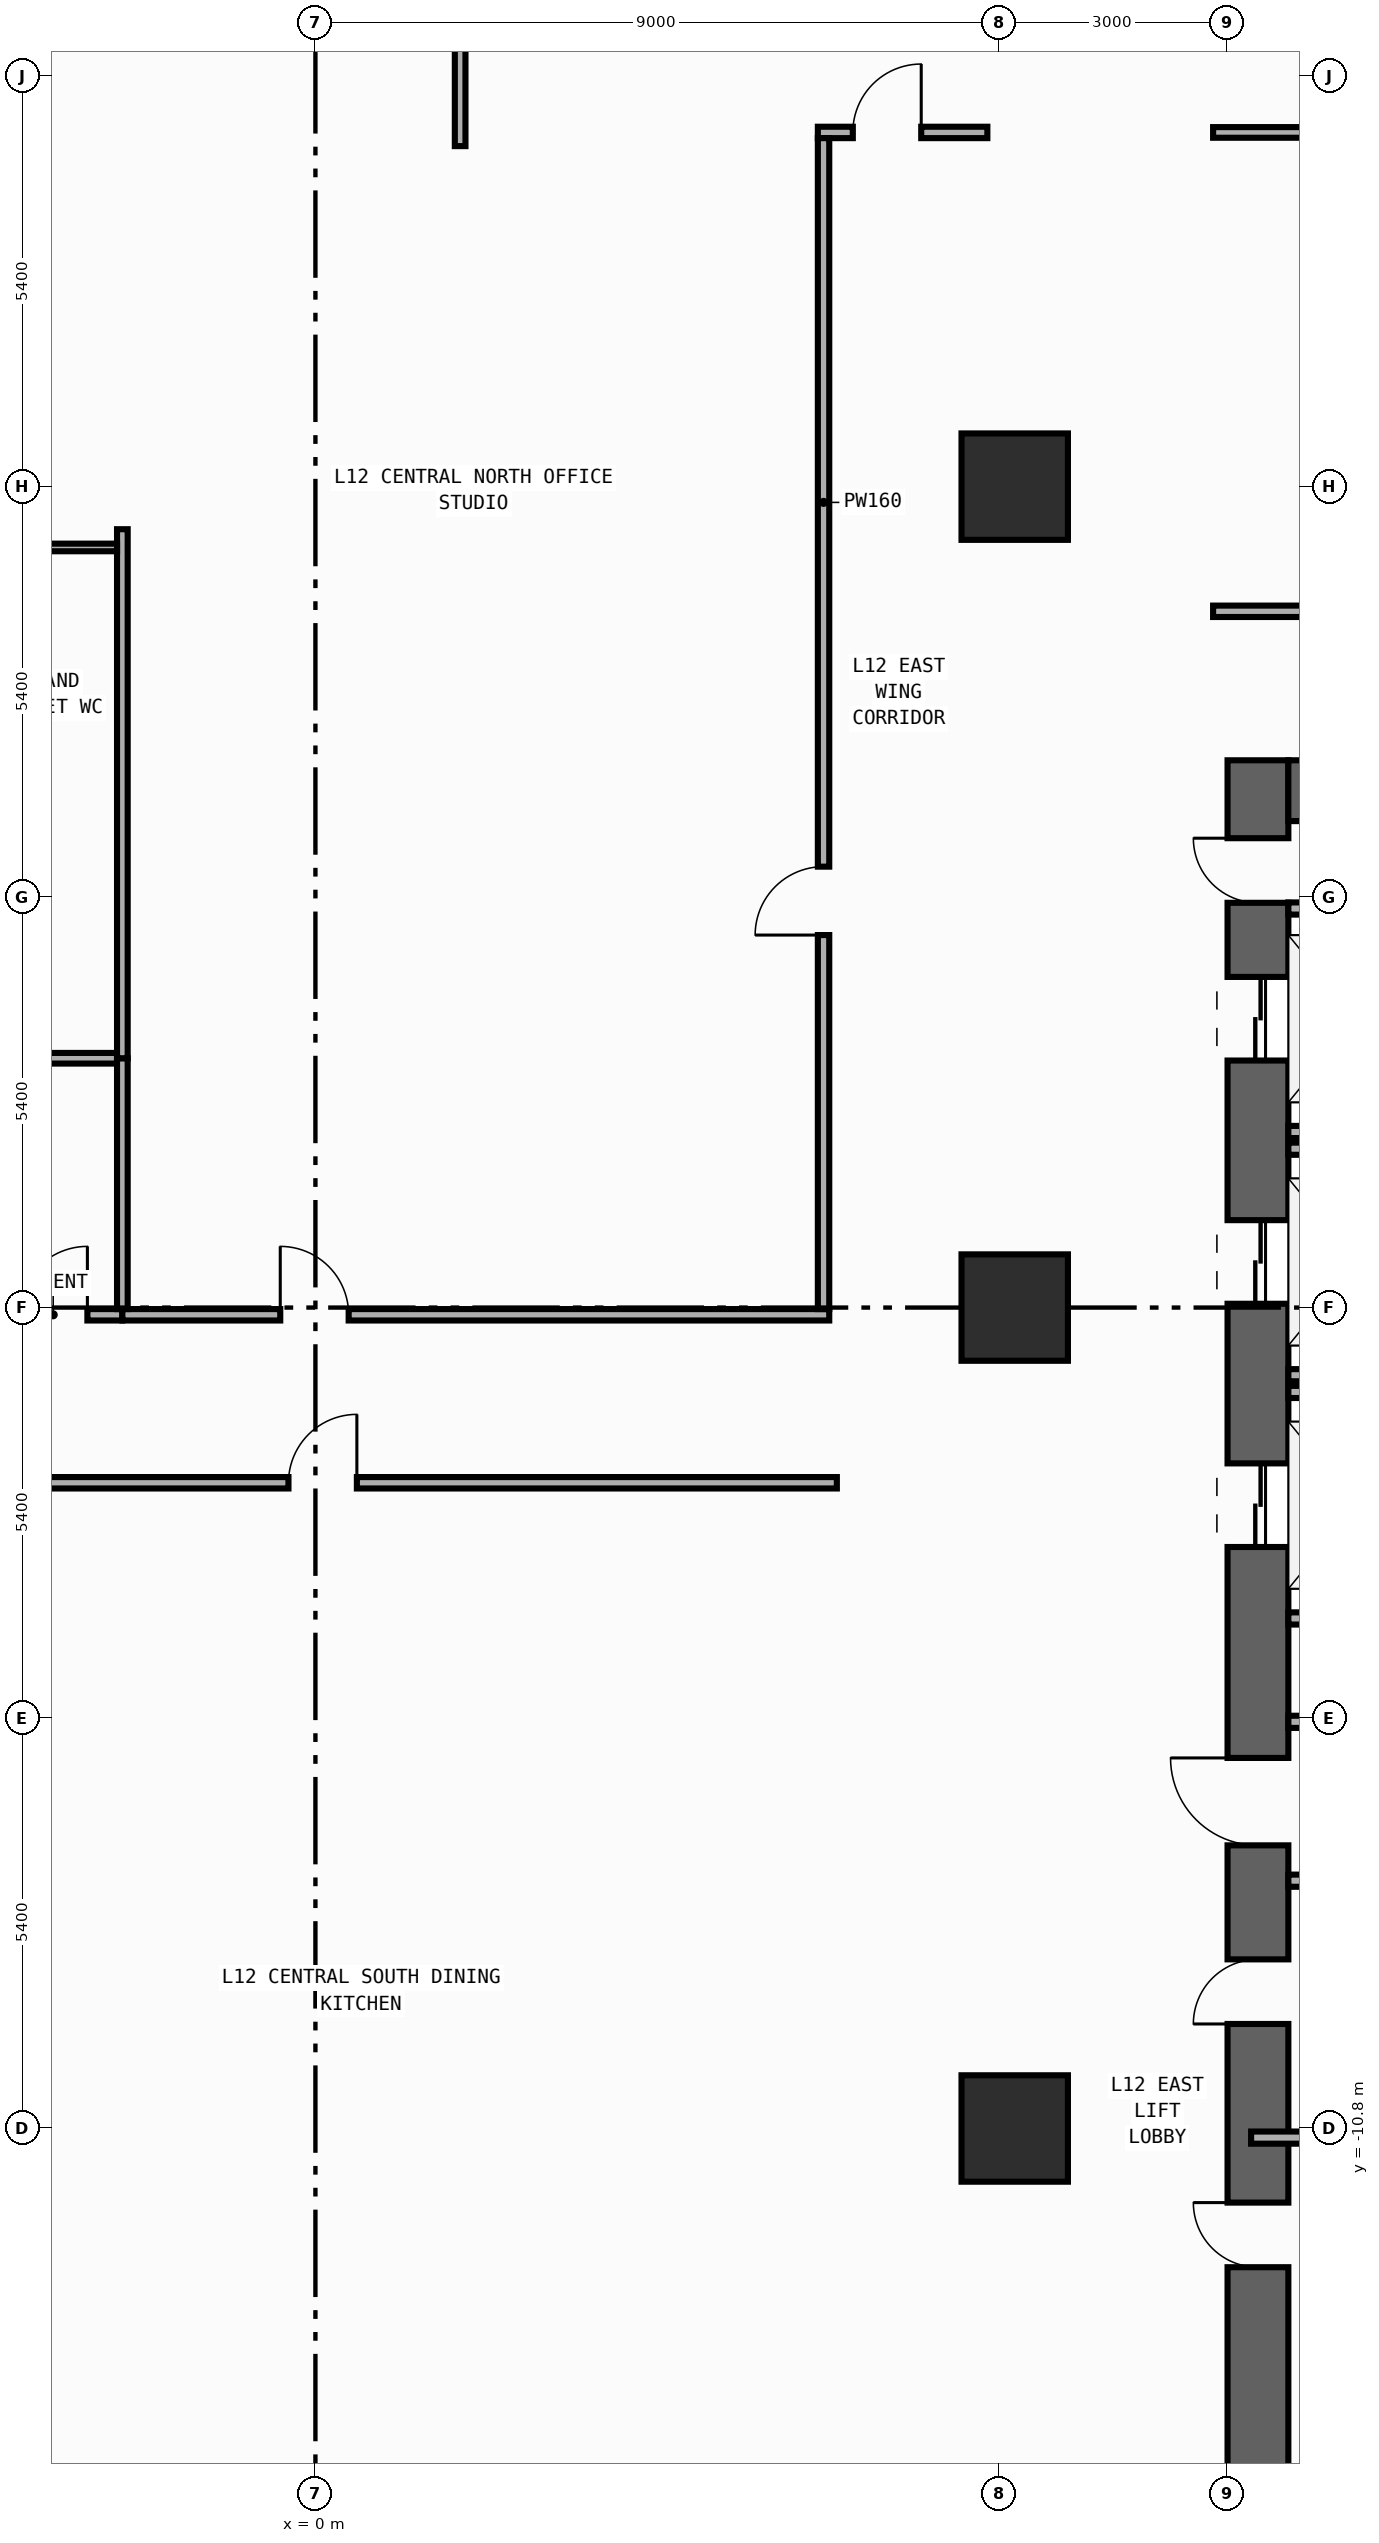
"""IFC4 building model, lengths in metres.
Left out: names, types, materials, properties, quantities, classifications, styles, units other than length and angle.
Written with IfcOpenShell. Run it as: python <this file> out.ifc"""

import sys

from ifc_helpers import new_model, si_unit, direction, frame, frame_2d, origin, origin_2d, place, context, subcontext, project, spatial, rectangle, extrude, element, fill, save


model = new_model("IFC4")
c1 = context("Model", 3, precision=1e-05, world=origin(), true_north=direction((0.0, 1.0)))
c2 = subcontext(c1, "Body", "Model", "MODEL_VIEW")
j1 = project(units=[si_unit("LENGTHUNIT", "METRE"), si_unit("PLANEANGLEUNIT", "RADIAN")], contexts=[c1])
p1 = place(None, origin())
s1 = spatial("IfcSite", under=j1, at=p1, CompositionType="ELEMENT")
p2 = place(p1, origin())
s2 = spatial("IfcBuilding", under=s1, at=p2, CompositionType="ELEMENT")
p3 = place(p2, frame((0.0, 0.0, 51.2)))
s3 = spatial("IfcBuildingStorey", under=s2, at=p3, CompositionType="ELEMENT", Elevation=51.2)
p4 = place(p3, frame((12.4, -19.8, 0.0), z_axis=(0.0, 0.0, 1.0), x_axis=(0.0, 1.0, 0.0)))
e1 = element("IfcWall", 1, at=p4, inside=s3, PredefinedType="SHEAR", context=c2, shape_type="SweptSolid", body=[
    extrude(rectangle(XDim=27.0, YDim=0.8, at=frame_2d((13.5, 0.0))), origin(), (0.0, 0.0, 1.0), 3.94),
])
p5 = place(p4, frame((23.05, 0.0, 0.0)))
e2 = element("IfcOpeningElement", 2, at=p5, cuts=e1, PredefinedType="OPENING", context=c2, shape_type="SweptSolid", body=[
    extrude(rectangle(XDim=1.1, YDim=2.2, at=frame_2d((0.55, 1.1))), frame((0.0, 0.41, 0.0), z_axis=(0.0, -1.0, 0.0), x_axis=(1.0, 0.0, 0.0)), (0.0, 0.0, 1.0), 0.82),
])
p6 = place(p4, frame((19.85, 0.0, 0.0)))
e3 = element("IfcOpeningElement", 3, at=p6, cuts=e1, PredefinedType="OPENING", context=c2, shape_type="SweptSolid", body=[
    extrude(rectangle(XDim=1.1, YDim=2.2, at=frame_2d((0.55, 1.1))), frame((0.0, 0.41, 0.0), z_axis=(0.0, -1.0, 0.0), x_axis=(1.0, 0.0, 0.0)), (0.0, 0.0, 1.0), 0.82),
])
p7 = place(p4, frame((16.65, 0.0, 0.0)))
e4 = element("IfcOpeningElement", 4, at=p7, cuts=e1, PredefinedType="OPENING", context=c2, shape_type="SweptSolid", body=[
    extrude(rectangle(XDim=1.1, YDim=2.2, at=frame_2d((0.55, 1.1))), frame((0.0, 0.41, 0.0), z_axis=(0.0, -1.0, 0.0), x_axis=(1.0, 0.0, 0.0)), (0.0, 0.0, 1.0), 0.82),
])
p8 = place(p4, frame((7.175, 0.0, 0.0)))
e5 = element("IfcOpeningElement", 5, at=p8, cuts=e1, PredefinedType="OPENING", context=c2, shape_type="SweptSolid", body=[
    extrude(rectangle(XDim=0.85, YDim=2.1, at=frame_2d((0.425, 1.05))), frame((0.0, 0.41, 0.0), z_axis=(0.0, -1.0, 0.0), x_axis=(1.0, 0.0, 0.0)), (0.0, 0.0, 1.0), 0.82),
])
p9 = place(p4, frame((10.375, 0.0, 0.0)))
e6 = element("IfcOpeningElement", 6, at=p9, cuts=e1, PredefinedType="OPENING", context=c2, shape_type="SweptSolid", body=[
    extrude(rectangle(XDim=0.85, YDim=2.1, at=frame_2d((0.425, 1.05))), frame((0.0, 0.41, 0.0), z_axis=(0.0, -1.0, 0.0), x_axis=(1.0, 0.0, 0.0)), (0.0, 0.0, 1.0), 0.82),
])
p10 = place(p4, frame((12.725, 0.0, 0.0)))
e7 = element("IfcOpeningElement", 7, at=p10, cuts=e1, PredefinedType="OPENING", context=c2, shape_type="SweptSolid", body=[
    extrude(rectangle(XDim=1.15, YDim=2.2, at=frame_2d((0.575, 1.1))), frame((0.0, 0.41, 0.0), z_axis=(0.0, -1.0, 0.0), x_axis=(1.0, 0.0, 0.0)), (0.0, 0.0, 1.0), 0.82),
])
p11 = place(p4, frame((25.125, 0.0, 0.0)))
e8 = element("IfcOpeningElement", 8, at=p11, cuts=e1, PredefinedType="OPENING", context=c2, shape_type="SweptSolid", body=[
    extrude(rectangle(XDim=0.85, YDim=2.1, at=frame_2d((0.425, 1.05))), frame((0.0, 0.41, 0.0), z_axis=(0.0, -1.0, 0.0), x_axis=(1.0, 0.0, 0.0)), (0.0, 0.0, 1.0), 0.82),
])
p12 = place(p3, frame((12.8, 6.8, 0.0), z_axis=(0.0, 0.0, 1.0), x_axis=(1.0, 0.0, 0.0)))
e9 = element("IfcWall", 9, at=p12, inside=s3, PredefinedType="SHEAR", context=c2, shape_type="SweptSolid", body=[
    extrude(rectangle(XDim=6.8, YDim=0.8, at=frame_2d((3.4, 0.0))), origin(), (0.0, 0.0, 1.0), 3.94),
])
for number, where, z_axis, x_axis in (
    (10, (9.2, -10.8, 0.0), (0.0, 0.0, 1.0), (1.0, 0.0, 0.0)),
    (11, (9.2, 0.0, 0.0), (0.0, 0.0, 1.0), (1.0, 0.0, 0.0)),
    (12, (9.2, 10.8, 0.0), (0.0, 0.0, 1.0), (1.0, 0.0, 0.0)),
):
    element("IfcColumn", number, at=place(p3, frame(where, z_axis=z_axis, x_axis=x_axis)), inside=s3, PredefinedType="COLUMN", context=c2, shape_type="SweptSolid", body=[
        extrude(rectangle(XDim=1.4, YDim=1.4, at=origin_2d()), origin(), (0.0, 0.0, 1.0), 4.2),
    ])
for number, where, z_axis, x_axis in (
    (13, (12.8, 2.31, 0.0), (0.0, 0.0, 1.0), (1.0, 0.0, 0.0)),
    (14, (12.8, -0.89, 0.0), (0.0, 0.0, 1.0), (1.0, 0.0, 0.0)),
    (15, (12.8, 2.09, 0.0), (0.0, 0.0, 1.0), (1.0, 0.0, 0.0)),
    (16, (12.8, -4.09, 0.0), (0.0, 0.0, 1.0), (1.0, 0.0, 0.0)),
    (17, (12.8, -1.11, 0.0), (0.0, 0.0, 1.0), (1.0, 0.0, 0.0)),
):
    element("IfcWall", number, at=place(p3, frame(where, z_axis=z_axis, x_axis=x_axis)), inside=s3, PredefinedType="STANDARD", context=c2, shape_type="SweptSolid", body=[
        extrude(rectangle(XDim=2.19, YDim=0.16, at=frame_2d((1.095, 0.0))), origin(), (0.0, 0.0, 1.0), 3.94),
    ])
for number, where, z_axis, x_axis in (
    (18, (12.8, -5.45, 0.0), (0.0, 0.0, 1.0), (1.0, 0.0, 0.0)),
    (19, (12.8, -7.54, 0.0), (0.0, 0.0, 1.0), (1.0, 0.0, 0.0)),
    (20, (12.8, 5.25, 0.0), (0.0, 0.0, 1.0), (1.0, 0.0, 0.0)),
):
    element("IfcWall", number, at=place(p3, frame(where, z_axis=z_axis, x_axis=x_axis)), inside=s3, PredefinedType="STANDARD", context=c2, shape_type="SweptSolid", body=[
        extrude(rectangle(XDim=2.6, YDim=0.16, at=frame_2d((1.3, 0.0))), origin(), (0.0, 0.0, 1.0), 3.94),
    ])
p13 = place(p3, frame((12.31, -10.92, 0.0), z_axis=(0.0, 0.0, 1.0), x_axis=(1.0, 0.0, 0.0)))
e21 = element("IfcWall", 21, at=p13, inside=s3, PredefinedType="PARTITIONING", context=c2, shape_type="SweptSolid", body=[
    extrude(rectangle(XDim=3.065, YDim=0.16, at=frame_2d((1.532, 0.0))), origin(), (0.0, 0.0, 1.0), 3.14),
])
p14 = place(p3, frame((-5.56, -0.095, 0.0), z_axis=(0.0, 0.0, 1.0), x_axis=(1.0, 0.0, 0.0)))
e22 = element("IfcWall", 22, at=p14, inside=s3, PredefinedType="PARTITIONING", context=c2, shape_type="SweptSolid", body=[
    extrude(rectangle(XDim=3.02, YDim=0.15, at=frame_2d((1.51, 0.0))), origin(), (0.0, 0.0, 1.0), 3.14),
])
p15 = place(p14, frame((1.66, 0.0, 0.0)))
e23 = element("IfcOpeningElement", 23, at=p15, cuts=e22, PredefinedType="OPENING", context=c2, shape_type="SweptSolid", body=[
    extrude(rectangle(XDim=0.9, YDim=2.15, at=frame_2d((0.45, 1.075))), frame((0.0, 0.085, 0.0), z_axis=(0.0, -1.0, 0.0), x_axis=(1.0, 0.0, 0.0)), (0.0, 0.0, 1.0), 0.17),
])
p16 = place(p3, frame((-2.54, -0.095, 0.0), z_axis=(0.0, 0.0, 1.0), x_axis=(1.0, 0.0, 0.0)))
e24 = element("IfcWall", 24, at=p16, inside=s3, PredefinedType="PARTITIONING", context=c2, shape_type="SweptSolid", body=[
    extrude(rectangle(XDim=9.3, YDim=0.15, at=frame_2d((4.65, 0.0))), origin(), (0.0, 0.0, 1.0), 3.14),
])
p17 = place(p16, frame((2.077, 0.0, 0.0)))
e25 = element("IfcOpeningElement", 25, at=p17, cuts=e24, PredefinedType="OPENING", context=c2, shape_type="SweptSolid", body=[
    extrude(rectangle(XDim=0.9, YDim=2.15, at=frame_2d((0.45, 1.075))), frame((0.0, 0.085, 0.0), z_axis=(0.0, -1.0, 0.0), x_axis=(1.0, 0.0, 0.0)), (0.0, 0.0, 1.0), 0.17),
])
p18 = place(p3, frame((-5.66, -2.305, 0.0), z_axis=(0.0, 0.0, 1.0), x_axis=(1.0, 0.0, 0.0)))
e26 = element("IfcWall", 26, at=p18, inside=s3, PredefinedType="PARTITIONING", context=c2, shape_type="SweptSolid", body=[
    extrude(rectangle(XDim=12.52, YDim=0.15, at=frame_2d((6.26, 0.0))), origin(), (0.0, 0.0, 1.0), 3.94),
])
p19 = place(p18, frame((5.305, 0.0, 0.0)))
e27 = element("IfcOpeningElement", 27, at=p19, cuts=e26, PredefinedType="OPENING", context=c2, shape_type="SweptSolid", body=[
    extrude(rectangle(XDim=0.9, YDim=2.15, at=frame_2d((0.45, 1.075))), frame((0.0, 0.085, 0.0), z_axis=(0.0, -1.0, 0.0), x_axis=(1.0, 0.0, 0.0)), (0.0, 0.0, 1.0), 0.17),
])
p20 = place(p3, frame((6.61, 15.46, 0.0), z_axis=(0.0, 0.0, 1.0), x_axis=(1.0, 0.0, 0.0)))
e28 = element("IfcWall", 28, at=p20, inside=s3, PredefinedType="PARTITIONING", context=c2, shape_type="SweptSolid", body=[
    extrude(rectangle(XDim=2.23, YDim=0.15, at=frame_2d((1.115, 0.0))), origin(), (0.0, 0.0, 1.0), 3.94),
])
p21 = place(p20, frame((0.46, 0.0, 0.0)))
e29 = element("IfcOpeningElement", 29, at=p21, cuts=e28, PredefinedType="OPENING", context=c2, shape_type="SweptSolid", body=[
    extrude(rectangle(XDim=0.9, YDim=2.15, at=frame_2d((0.45, 1.075))), frame((0.0, 0.085, 0.0), z_axis=(0.0, -1.0, 0.0), x_axis=(1.0, 0.0, 0.0)), (0.0, 0.0, 1.0), 0.17),
])
p22 = place(p3, frame((6.685, -0.02, 0.0), z_axis=(0.0, 0.0, 1.0), x_axis=(0.0, 1.0, 0.0)))
e30 = element("IfcWall", 30, at=p22, inside=s3, PredefinedType="PARTITIONING", context=c2, shape_type="SweptSolid", body=[
    extrude(rectangle(XDim=15.405, YDim=0.15, at=frame_2d((7.703, 0.0))), origin(), (0.0, 0.0, 1.0), 3.94),
])
p23 = place(p22, frame((4.921, 0.0, 0.0)))
e31 = element("IfcOpeningElement", 31, at=p23, cuts=e30, PredefinedType="OPENING", context=c2, shape_type="SweptSolid", body=[
    extrude(rectangle(XDim=0.9, YDim=2.15, at=frame_2d((0.45, 1.075))), frame((0.0, 0.085, 0.0), z_axis=(0.0, -1.0, 0.0), x_axis=(1.0, 0.0, 0.0)), (0.0, 0.0, 1.0), 0.17),
])
p24 = place(p3, frame((11.81, 9.16, 0.0), z_axis=(0.0, 0.0, 1.0), x_axis=(1.0, 0.0, 0.0)))
e32 = element("IfcWall", 32, at=p24, inside=s3, PredefinedType="PARTITIONING", context=c2, shape_type="SweptSolid", body=[
    extrude(rectangle(XDim=8.83, YDim=0.15, at=frame_2d((4.415, 0.0))), origin(), (0.0, 0.0, 1.0), 3.94),
])
p25 = place(p24, frame((5.067, 0.0, 0.0)))
e33 = element("IfcOpeningElement", 33, at=p25, cuts=e32, PredefinedType="OPENING", context=c2, shape_type="SweptSolid", body=[
    extrude(rectangle(XDim=0.9, YDim=2.15, at=frame_2d((0.45, 1.075))), frame((0.0, 0.085, 0.0), z_axis=(0.0, -1.0, 0.0), x_axis=(1.0, 0.0, 0.0)), (0.0, 0.0, 1.0), 0.17),
])
p26 = place(p3, frame((11.81, 15.46, 0.0), z_axis=(0.0, 0.0, 1.0), x_axis=(1.0, 0.0, 0.0)))
e34 = element("IfcWall", 34, at=p26, inside=s3, PredefinedType="PARTITIONING", context=c2, shape_type="SweptSolid", body=[
    extrude(rectangle(XDim=1.518, YDim=0.14, at=frame_2d((0.759, 0.0))), origin(), (0.0, 0.0, 1.0), 3.94),
])
p27 = place(p3, frame((1.904, 15.28, 0.0), z_axis=(0.0, 0.0, 1.0), x_axis=(0.0, 1.0, 0.0)))
e35 = element("IfcWall", 35, at=p27, inside=s3, PredefinedType="PARTITIONING", context=c2, shape_type="SweptSolid", body=[
    extrude(rectangle(XDim=11.575, YDim=0.14, at=frame_2d((5.788, 0.0))), origin(), (0.0, 0.0, 1.0), 3.94),
])
p28 = place(p3, frame((-5.41, 3.28, 0.0), z_axis=(0.0, 0.0, 1.0), x_axis=(1.0, 0.0, 0.0)))
e36 = element("IfcWall", 36, at=p28, inside=s3, PredefinedType="PARTITIONING", context=c2, shape_type="SweptSolid", body=[
    extrude(rectangle(XDim=2.8, YDim=0.14, at=frame_2d((1.4, 0.0))), origin(), (0.0, 0.0, 1.0), 3.94),
])
p29 = place(p3, frame((-2.54, -0.02, 0.0), z_axis=(0.0, 0.0, 1.0), x_axis=(0.0, 1.0, 0.0)))
e37 = element("IfcWall", 37, at=p29, inside=s3, PredefinedType="PARTITIONING", context=c2, shape_type="SweptSolid", body=[
    extrude(rectangle(XDim=3.3, YDim=0.14, at=frame_2d((1.65, 0.0))), origin(), (0.0, 0.0, 1.0), 3.94),
])
p30 = place(p3, frame((-2.54, 3.28, 0.0), z_axis=(0.0, 0.0, 1.0), x_axis=(0.0, 1.0, 0.0)))
e38 = element("IfcWall", 38, at=p30, inside=s3, PredefinedType="PARTITIONING", context=c2, shape_type="SweptSolid", body=[
    extrude(rectangle(XDim=6.96, YDim=0.14, at=frame_2d((3.48, 0.0))), origin(), (0.0, 0.0, 1.0), 3.94),
])
p31 = place(p3, frame((-5.41, 10.0, 0.0), z_axis=(0.0, 0.0, 1.0), x_axis=(1.0, 0.0, 0.0)))
e39 = element("IfcWall", 39, at=p31, inside=s3, PredefinedType="PARTITIONING", context=c2, shape_type="SweptSolid", body=[
    extrude(rectangle(XDim=2.8, YDim=0.1, at=frame_2d((1.4, 0.0))), origin(), (0.0, 0.0, 1.0), 3.94),
])
p32 = place(p5, origin())
e40 = element("IfcDoor", 40, at=p32, inside=s3, OperationType="DOUBLE_DOOR_SLIDING", PredefinedType="DOOR", context=c2, shape_type="SweptSolid", body=[
    extrude(rectangle(XDim=1.1, YDim=2.2, at=frame_2d((0.55, 1.1))), frame((0.0, 0.025, 0.0), z_axis=(0.0, -1.0, 0.0), x_axis=(1.0, 0.0, 0.0)), (0.0, 0.0, 1.0), 0.05),
])
fill(e2, e40)
p33 = place(p6, origin())
e41 = element("IfcDoor", 41, at=p33, inside=s3, OperationType="DOUBLE_DOOR_SLIDING", PredefinedType="DOOR", context=c2, shape_type="SweptSolid", body=[
    extrude(rectangle(XDim=1.1, YDim=2.2, at=frame_2d((0.55, 1.1))), frame((0.0, 0.025, 0.0), z_axis=(0.0, -1.0, 0.0), x_axis=(1.0, 0.0, 0.0)), (0.0, 0.0, 1.0), 0.05),
])
fill(e3, e41)
p34 = place(p7, origin())
e42 = element("IfcDoor", 42, at=p34, inside=s3, OperationType="DOUBLE_DOOR_SLIDING", PredefinedType="DOOR", context=c2, shape_type="SweptSolid", body=[
    extrude(rectangle(XDim=1.1, YDim=2.2, at=frame_2d((0.55, 1.1))), frame((0.0, 0.025, 0.0), z_axis=(0.0, -1.0, 0.0), x_axis=(1.0, 0.0, 0.0)), (0.0, 0.0, 1.0), 0.05),
])
fill(e4, e42)
p35 = place(p8, origin())
e43 = element("IfcDoor", 43, at=p35, inside=s3, OperationType="SINGLE_SWING_RIGHT", PredefinedType="DOOR", context=c2, shape_type="SweptSolid", body=[
    extrude(rectangle(XDim=0.85, YDim=2.1, at=frame_2d((0.425, 1.05))), frame((0.0, 0.025, 0.0), z_axis=(0.0, -1.0, 0.0), x_axis=(1.0, 0.0, 0.0)), (0.0, 0.0, 1.0), 0.05),
])
fill(e5, e43)
p36 = place(p9, origin())
e44 = element("IfcDoor", 44, at=p36, inside=s3, OperationType="SINGLE_SWING_LEFT", PredefinedType="DOOR", context=c2, shape_type="SweptSolid", body=[
    extrude(rectangle(XDim=0.85, YDim=2.1, at=frame_2d((0.425, 1.05))), frame((0.0, 0.025, 0.0), z_axis=(0.0, -1.0, 0.0), x_axis=(1.0, 0.0, 0.0)), (0.0, 0.0, 1.0), 0.05),
])
fill(e6, e44)
p37 = place(p10, origin())
e45 = element("IfcDoor", 45, at=p37, inside=s3, OperationType="SINGLE_SWING_RIGHT", PredefinedType="DOOR", context=c2, shape_type="SweptSolid", body=[
    extrude(rectangle(XDim=1.15, YDim=2.2, at=frame_2d((0.575, 1.1))), frame((0.0, 0.025, 0.0), z_axis=(0.0, -1.0, 0.0), x_axis=(1.0, 0.0, 0.0)), (0.0, 0.0, 1.0), 0.05),
])
fill(e7, e45)
p38 = place(p11, origin())
e46 = element("IfcDoor", 46, at=p38, inside=s3, OperationType="SINGLE_SWING_RIGHT", PredefinedType="DOOR", context=c2, shape_type="SweptSolid", body=[
    extrude(rectangle(XDim=0.85, YDim=2.1, at=frame_2d((0.425, 1.05))), frame((0.0, 0.025, 0.0), z_axis=(0.0, -1.0, 0.0), x_axis=(1.0, 0.0, 0.0)), (0.0, 0.0, 1.0), 0.05),
])
fill(e8, e46)
p39 = place(p15, origin())
e47 = element("IfcDoor", 47, at=p39, inside=s3, OperationType="SINGLE_SWING_RIGHT", PredefinedType="DOOR", context=c2, shape_type="SweptSolid", body=[
    extrude(rectangle(XDim=0.9, YDim=2.15, at=frame_2d((0.45, 1.075))), frame((0.0, 0.025, 0.0), z_axis=(0.0, -1.0, 0.0), x_axis=(1.0, 0.0, 0.0)), (0.0, 0.0, 1.0), 0.05),
])
fill(e23, e47)
p40 = place(p17, origin())
e48 = element("IfcDoor", 48, at=p40, inside=s3, OperationType="SINGLE_SWING_LEFT", PredefinedType="DOOR", context=c2, shape_type="SweptSolid", body=[
    extrude(rectangle(XDim=0.9, YDim=2.15, at=frame_2d((0.45, 1.075))), frame((0.0, 0.025, 0.0), z_axis=(0.0, -1.0, 0.0), x_axis=(1.0, 0.0, 0.0)), (0.0, 0.0, 1.0), 0.05),
])
fill(e25, e48)
p41 = place(p19, origin())
e49 = element("IfcDoor", 49, at=p41, inside=s3, OperationType="SINGLE_SWING_RIGHT", PredefinedType="DOOR", context=c2, shape_type="SweptSolid", body=[
    extrude(rectangle(XDim=0.9, YDim=2.15, at=frame_2d((0.45, 1.075))), frame((0.0, 0.025, 0.0), z_axis=(0.0, -1.0, 0.0), x_axis=(1.0, 0.0, 0.0)), (0.0, 0.0, 1.0), 0.05),
])
fill(e27, e49)
p42 = place(p21, origin())
e50 = element("IfcDoor", 50, at=p42, inside=s3, OperationType="SINGLE_SWING_RIGHT", PredefinedType="DOOR", context=c2, shape_type="SweptSolid", body=[
    extrude(rectangle(XDim=0.9, YDim=2.15, at=frame_2d((0.45, 1.075))), frame((0.0, 0.025, 0.0), z_axis=(0.0, -1.0, 0.0), x_axis=(1.0, 0.0, 0.0)), (0.0, 0.0, 1.0), 0.05),
])
fill(e29, e50)
p43 = place(p23, origin())
e51 = element("IfcDoor", 51, at=p43, inside=s3, OperationType="SINGLE_SWING_LEFT", PredefinedType="DOOR", context=c2, shape_type="SweptSolid", body=[
    extrude(rectangle(XDim=0.9, YDim=2.15, at=frame_2d((0.45, 1.075))), frame((0.0, 0.025, 0.0), z_axis=(0.0, -1.0, 0.0), x_axis=(1.0, 0.0, 0.0)), (0.0, 0.0, 1.0), 0.05),
])
fill(e31, e51)
save(model, sys.argv[1])
